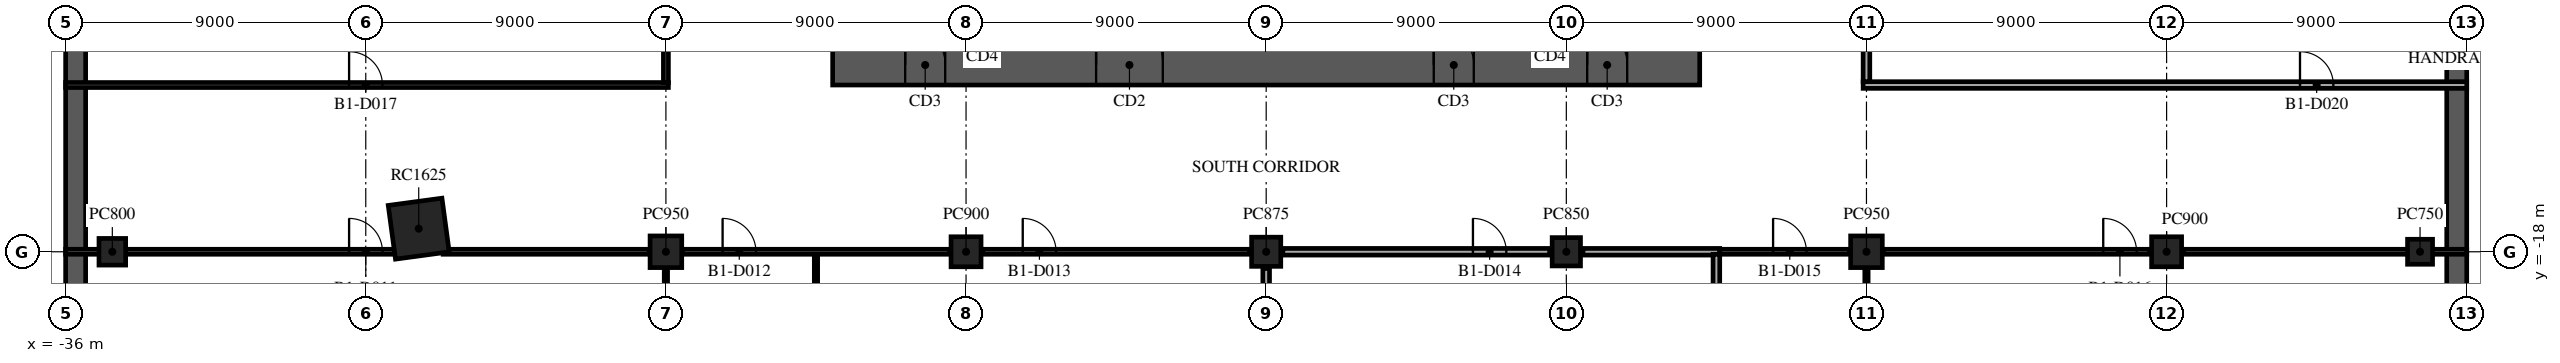
"""IFC4 building model, lengths in metres.
Left out: names, types, materials, properties, quantities, classifications, styles, units other than length and angle.
Written with IfcOpenShell. Run it as: python <this file> out.ifc"""

import sys

from ifc_helpers import new_model, si_unit, direction, frame, frame_2d, origin, origin_2d, place, context, subcontext, project, spatial, rectangle, extrude, element, fill, save


model = new_model("IFC4")
c1 = context("Model", 3, precision=1e-05, world=origin(), true_north=direction((0.0, 1.0)))
c2 = subcontext(c1, "Body", "Model", "MODEL_VIEW")
j1 = project(units=[si_unit("LENGTHUNIT", "METRE"), si_unit("PLANEANGLEUNIT", "RADIAN")], contexts=[c1])
p1 = place(None, origin())
s1 = spatial("IfcSite", under=j1, at=p1, CompositionType="ELEMENT")
p2 = place(p1, origin())
s2 = spatial("IfcBuilding", under=s1, at=p2, CompositionType="ELEMENT")
p3 = place(p2, frame((0.0, 0.0, -4.5)))
s3 = spatial("IfcBuildingStorey", under=s2, at=p3, CompositionType="ELEMENT", Elevation=-4.5)
for number, where, z_axis, x_axis in (
    (1, (35.7, -31.0, -0.3), (0.0, 0.0, 1.0), (0.0, 1.0, 0.0)),
    (2, (-35.7, 31.0, -0.3), (0.0, 0.0, 1.0), (0.0, -1.0, 0.0)),
):
    element("IfcWall", number, at=place(p3, frame(where, z_axis=z_axis, x_axis=x_axis)), inside=s3, PredefinedType="SOLIDWALL", context=c2, shape_type="SweptSolid", body=[
        extrude(rectangle(XDim=62.0, YDim=0.6, at=frame_2d((31.0, 0.0))), origin(), (0.0, 0.0, 1.0), 4.4),
    ])
p4 = place(p3, frame((-34.6, -18.0, 0.0), z_axis=(0.0, 0.0, 1.0), x_axis=(1.0, 0.0, 0.0)))
e3 = element("IfcColumn", 3, at=p4, inside=s3, PredefinedType="COLUMN", context=c2, shape_type="SweptSolid", body=[
    extrude(rectangle(XDim=0.8, YDim=0.8, at=origin_2d()), origin(), (0.0, 0.0, 1.0), 4.5),
])
p5 = place(p3, frame((-18.0, -18.0, 0.0), z_axis=(0.0, 0.0, 1.0), x_axis=(1.0, 0.0, 0.0)))
e4 = element("IfcColumn", 4, at=p5, inside=s3, PredefinedType="COLUMN", context=c2, shape_type="SweptSolid", body=[
    extrude(rectangle(XDim=0.95, YDim=0.95, at=origin_2d()), origin(), (0.0, 0.0, 1.0), 4.5),
])
p6 = place(p3, frame((-9.0, -18.0, 0.0), z_axis=(0.0, 0.0, 1.0), x_axis=(1.0, 0.0, 0.0)))
e5 = element("IfcColumn", 5, at=p6, inside=s3, PredefinedType="COLUMN", context=c2, shape_type="SweptSolid", body=[
    extrude(rectangle(XDim=0.9, YDim=0.9, at=origin_2d()), origin(), (0.0, 0.0, 1.0), 4.5),
])
p7 = place(p3, frame((0.0, -18.0, 0.0), z_axis=(0.0, 0.0, 1.0), x_axis=(1.0, 0.0, 0.0)))
e6 = element("IfcColumn", 6, at=p7, inside=s3, PredefinedType="COLUMN", context=c2, shape_type="SweptSolid", body=[
    extrude(rectangle(XDim=0.875, YDim=0.875, at=origin_2d()), origin(), (0.0, 0.0, 1.0), 4.5),
])
p8 = place(p3, frame((9.0, -18.0, 0.0), z_axis=(0.0, 0.0, 1.0), x_axis=(1.0, 0.0, 0.0)))
e7 = element("IfcColumn", 7, at=p8, inside=s3, PredefinedType="COLUMN", context=c2, shape_type="SweptSolid", body=[
    extrude(rectangle(XDim=0.85, YDim=0.85, at=origin_2d()), origin(), (0.0, 0.0, 1.0), 4.5),
])
p9 = place(p3, frame((18.0, -18.0, 0.0), z_axis=(0.0, 0.0, 1.0), x_axis=(1.0, 0.0, 0.0)))
e8 = element("IfcColumn", 8, at=p9, inside=s3, PredefinedType="COLUMN", context=c2, shape_type="SweptSolid", body=[
    extrude(rectangle(XDim=0.95, YDim=0.95, at=origin_2d()), origin(), (0.0, 0.0, 1.0), 4.5),
])
p10 = place(p3, frame((27.0, -18.0, 0.0), z_axis=(0.0, 0.0, 1.0), x_axis=(1.0, 0.0, 0.0)))
e9 = element("IfcColumn", 9, at=p10, inside=s3, PredefinedType="COLUMN", context=c2, shape_type="SweptSolid", body=[
    extrude(rectangle(XDim=0.9, YDim=0.9, at=origin_2d()), origin(), (0.0, 0.0, 1.0), 4.5),
])
p11 = place(p3, frame((34.6, -18.0, 0.0), z_axis=(0.0, 0.0, 1.0), x_axis=(1.0, 0.0, 0.0)))
e10 = element("IfcColumn", 10, at=p11, inside=s3, PredefinedType="COLUMN", context=c2, shape_type="SweptSolid", body=[
    extrude(rectangle(XDim=0.75, YDim=0.75, at=origin_2d()), origin(), (0.0, 0.0, 1.0), 4.5),
])
p12 = place(p3, frame((-25.412, -17.307, 0.0), z_axis=(0.0, 0.0, 1.0), x_axis=(0.991001197216, 0.133853005627, 0.0)))
e11 = element("IfcColumn", 11, at=p12, inside=s3, PredefinedType="COLUMN", context=c2, shape_type="SweptSolid", body=[
    extrude(rectangle(XDim=1.625, YDim=1.625, at=origin_2d()), origin(), (0.0, 0.0, 1.0), 4.5),
])
p13 = place(p3, frame((-13.0, -12.4, 0.0), z_axis=(0.0, 0.0, 1.0), x_axis=(1.0, 0.0, 0.0)))
e12 = element("IfcWall", 12, at=p13, inside=s3, PredefinedType="SHEAR", context=c2, shape_type="SweptSolid", body=[
    extrude(rectangle(XDim=26.0, YDim=1.2, at=frame_2d((13.0, 0.0))), origin(), (0.0, 0.0, 1.0), 4.1),
])
p14 = place(p13, frame((7.9, 0.0, 0.0)))
e13 = element("IfcOpeningElement", 13, at=p14, cuts=e12, PredefinedType="OPENING", context=c2, shape_type="SweptSolid", body=[
    extrude(rectangle(XDim=2.0, YDim=2.1, at=frame_2d((1.0, 1.05))), frame((0.0, 0.61, 0.0), z_axis=(0.0, -1.0, 0.0), x_axis=(1.0, 0.0, 0.0)), (0.0, 0.0, 1.0), 1.22),
])
p15 = place(p13, frame((18.025, 0.0, 0.0)))
e14 = element("IfcOpeningElement", 14, at=p15, cuts=e12, PredefinedType="OPENING", context=c2, shape_type="SweptSolid", body=[
    extrude(rectangle(XDim=1.2, YDim=2.1, at=frame_2d((0.6, 1.05))), frame((0.0, 0.61, 0.0), z_axis=(0.0, -1.0, 0.0), x_axis=(1.0, 0.0, 0.0)), (0.0, 0.0, 1.0), 1.22),
])
p16 = place(p13, frame((2.175, 0.0, 0.0)))
e15 = element("IfcOpeningElement", 15, at=p16, cuts=e12, PredefinedType="OPENING", context=c2, shape_type="SweptSolid", body=[
    extrude(rectangle(XDim=1.2, YDim=2.1, at=frame_2d((0.6, 1.05))), frame((0.0, 0.61, 0.0), z_axis=(0.0, -1.0, 0.0), x_axis=(1.0, 0.0, 0.0)), (0.0, 0.0, 1.0), 1.22),
])
p17 = place(p13, frame((22.625, 0.0, 0.0)))
e16 = element("IfcOpeningElement", 16, at=p17, cuts=e12, PredefinedType="OPENING", context=c2, shape_type="SweptSolid", body=[
    extrude(rectangle(XDim=1.2, YDim=2.1, at=frame_2d((0.6, 1.05))), frame((0.0, 0.61, 0.0), z_axis=(0.0, -1.0, 0.0), x_axis=(1.0, 0.0, 0.0)), (0.0, 0.0, 1.0), 1.22),
])
p18 = place(p3, frame((-36.0, -18.0, 0.0), z_axis=(0.0, 0.0, 1.0), x_axis=(1.0, 0.0, 0.0)))
e17 = element("IfcWall", 17, at=p18, inside=s3, PredefinedType="PARTITIONING", context=c2, shape_type="SweptSolid", body=[
    extrude(rectangle(XDim=9.857, YDim=0.15, at=frame_2d((4.928, 0.0))), origin(), (0.0, 0.0, 1.0), 4.1),
])
p19 = place(p18, frame((8.5, 0.0, 0.0)))
e18 = element("IfcOpeningElement", 18, at=p19, cuts=e17, PredefinedType="OPENING", context=c2, shape_type="SweptSolid", body=[
    extrude(rectangle(XDim=1.0, YDim=2.1, at=frame_2d((0.5, 1.05))), frame((0.0, 0.085, 0.0), z_axis=(0.0, -1.0, 0.0), x_axis=(1.0, 0.0, 0.0)), (0.0, 0.0, 1.0), 0.17),
])
p20 = place(p3, frame((-24.681, -18.0, 0.0), z_axis=(0.0, 0.0, 1.0), x_axis=(1.0, 0.0, 0.0)))
e19 = element("IfcWall", 19, at=p20, inside=s3, PredefinedType="PARTITIONING", context=c2, shape_type="SweptSolid", body=[
    extrude(rectangle(XDim=6.181, YDim=0.15, at=frame_2d((3.09, 0.0))), origin(), (0.0, 0.0, 1.0), 4.1),
])
p21 = place(p3, frame((-17.5, -18.0, 0.0), z_axis=(0.0, 0.0, 1.0), x_axis=(1.0, 0.0, 0.0)))
e20 = element("IfcWall", 20, at=p21, inside=s3, PredefinedType="PARTITIONING", context=c2, shape_type="SweptSolid", body=[
    extrude(rectangle(XDim=8.0, YDim=0.15, at=frame_2d((4.0, 0.0))), origin(), (0.0, 0.0, 1.0), 4.1),
])
p22 = place(p21, frame((1.2, 0.0, 0.0)))
e21 = element("IfcOpeningElement", 21, at=p22, cuts=e20, PredefinedType="OPENING", context=c2, shape_type="SweptSolid", body=[
    extrude(rectangle(XDim=1.0, YDim=2.1, at=frame_2d((0.5, 1.05))), frame((0.0, 0.085, 0.0), z_axis=(0.0, -1.0, 0.0), x_axis=(1.0, 0.0, 0.0)), (0.0, 0.0, 1.0), 0.17),
])
p23 = place(p3, frame((-8.5, -18.0, 0.0), z_axis=(0.0, 0.0, 1.0), x_axis=(1.0, 0.0, 0.0)))
e22 = element("IfcWall", 22, at=p23, inside=s3, PredefinedType="PARTITIONING", context=c2, shape_type="SweptSolid", body=[
    extrude(rectangle(XDim=8.0, YDim=0.15, at=frame_2d((4.0, 0.0))), origin(), (0.0, 0.0, 1.0), 4.1),
])
p24 = place(p23, frame((1.2, 0.0, 0.0)))
e23 = element("IfcOpeningElement", 23, at=p24, cuts=e22, PredefinedType="OPENING", context=c2, shape_type="SweptSolid", body=[
    extrude(rectangle(XDim=1.0, YDim=2.1, at=frame_2d((0.5, 1.05))), frame((0.0, 0.085, 0.0), z_axis=(0.0, -1.0, 0.0), x_axis=(1.0, 0.0, 0.0)), (0.0, 0.0, 1.0), 0.17),
])
p25 = place(p3, frame((0.5, -18.0, 0.0), z_axis=(0.0, 0.0, 1.0), x_axis=(1.0, 0.0, 0.0)))
e24 = element("IfcWall", 24, at=p25, inside=s3, PredefinedType="PARTITIONING", context=c2, shape_type="SweptSolid", body=[
    extrude(rectangle(XDim=8.0, YDim=0.2, at=frame_2d((4.0, 0.0))), origin(), (0.0, 0.0, 1.0), 4.1),
])
p26 = place(p25, frame((5.7, 0.0, 0.0)))
e25 = element("IfcOpeningElement", 25, at=p26, cuts=e24, PredefinedType="OPENING", context=c2, shape_type="SweptSolid", body=[
    extrude(rectangle(XDim=1.0, YDim=2.1, at=frame_2d((0.5, 1.05))), frame((0.0, 0.11, 0.0), z_axis=(0.0, -1.0, 0.0), x_axis=(1.0, 0.0, 0.0)), (0.0, 0.0, 1.0), 0.22),
])
p27 = place(p3, frame((9.5, -18.0, 0.0), z_axis=(0.0, 0.0, 1.0), x_axis=(1.0, 0.0, 0.0)))
e26 = element("IfcWall", 26, at=p27, inside=s3, PredefinedType="PARTITIONING", context=c2, shape_type="SweptSolid", body=[
    extrude(rectangle(XDim=4.1, YDim=0.2, at=frame_2d((2.05, 0.0))), origin(), (0.0, 0.0, 1.0), 4.1),
])
p28 = place(p3, frame((13.6, -18.0, 0.0), z_axis=(0.0, 0.0, 1.0), x_axis=(1.0, 0.0, 0.0)))
e27 = element("IfcWall", 27, at=p28, inside=s3, PredefinedType="PARTITIONING", context=c2, shape_type="SweptSolid", body=[
    extrude(rectangle(XDim=3.9, YDim=0.15, at=frame_2d((1.95, 0.0))), origin(), (0.0, 0.0, 1.0), 4.1),
])
p29 = place(p28, frame((1.6, 0.0, 0.0)))
e28 = element("IfcOpeningElement", 28, at=p29, cuts=e27, PredefinedType="OPENING", context=c2, shape_type="SweptSolid", body=[
    extrude(rectangle(XDim=1.0, YDim=2.1, at=frame_2d((0.5, 1.05))), frame((0.0, 0.085, 0.0), z_axis=(0.0, -1.0, 0.0), x_axis=(1.0, 0.0, 0.0)), (0.0, 0.0, 1.0), 0.17),
])
p30 = place(p3, frame((18.5, -18.0, 0.0), z_axis=(0.0, 0.0, 1.0), x_axis=(1.0, 0.0, 0.0)))
e29 = element("IfcWall", 29, at=p30, inside=s3, PredefinedType="PARTITIONING", context=c2, shape_type="SweptSolid", body=[
    extrude(rectangle(XDim=8.0, YDim=0.15, at=frame_2d((4.0, 0.0))), origin(), (0.0, 0.0, 1.0), 4.1),
])
p31 = place(p30, frame((6.6, 0.0, 0.0)))
e30 = element("IfcOpeningElement", 30, at=p31, cuts=e29, PredefinedType="OPENING", context=c2, shape_type="SweptSolid", body=[
    extrude(rectangle(XDim=1.0, YDim=2.1, at=frame_2d((0.5, 1.05))), frame((0.0, 0.085, 0.0), z_axis=(0.0, -1.0, 0.0), x_axis=(1.0, 0.0, 0.0)), (0.0, 0.0, 1.0), 0.17),
])
p32 = place(p3, frame((27.5, -18.0, 0.0), z_axis=(0.0, 0.0, 1.0), x_axis=(1.0, 0.0, 0.0)))
e31 = element("IfcWall", 31, at=p32, inside=s3, PredefinedType="PARTITIONING", context=c2, shape_type="SweptSolid", body=[
    extrude(rectangle(XDim=8.5, YDim=0.15, at=frame_2d((4.25, 0.0))), origin(), (0.0, 0.0, 1.0), 4.1),
])
p33 = place(p3, frame((-36.0, -13.0, 0.0), z_axis=(0.0, 0.0, 1.0), x_axis=(1.0, 0.0, 0.0)))
e32 = element("IfcWall", 32, at=p33, inside=s3, PredefinedType="PARTITIONING", context=c2, shape_type="SweptSolid", body=[
    extrude(rectangle(XDim=18.075, YDim=0.15, at=frame_2d((9.038, 0.0))), origin(), (0.0, 0.0, 1.0), 4.1),
])
p34 = place(p33, frame((8.5, 0.0, 0.0)))
e33 = element("IfcOpeningElement", 33, at=p34, cuts=e32, PredefinedType="OPENING", context=c2, shape_type="SweptSolid", body=[
    extrude(rectangle(XDim=1.0, YDim=2.1, at=frame_2d((0.5, 1.05))), frame((0.0, 0.085, 0.0), z_axis=(0.0, -1.0, 0.0), x_axis=(1.0, 0.0, 0.0)), (0.0, 0.0, 1.0), 0.17),
])
p35 = place(p3, frame((17.9, -13.0, 0.0), z_axis=(0.0, 0.0, 1.0), x_axis=(1.0, 0.0, 0.0)))
e34 = element("IfcWall", 34, at=p35, inside=s3, PredefinedType="PARTITIONING", context=c2, shape_type="SweptSolid", body=[
    extrude(rectangle(XDim=18.1, YDim=0.2, at=frame_2d((9.05, 0.0))), origin(), (0.0, 0.0, 1.0), 4.1),
])
p36 = place(p35, frame((13.1, 0.0, 0.0)))
e35 = element("IfcOpeningElement", 35, at=p36, cuts=e34, PredefinedType="OPENING", context=c2, shape_type="SweptSolid", body=[
    extrude(rectangle(XDim=1.0, YDim=2.1, at=frame_2d((0.5, 1.05))), frame((0.0, 0.11, 0.0), z_axis=(0.0, -1.0, 0.0), x_axis=(1.0, 0.0, 0.0)), (0.0, 0.0, 1.0), 0.22),
])
p37 = place(p3, frame((-18.0, -26.5, 0.0), z_axis=(0.0, 0.0, 1.0), x_axis=(0.0, 1.0, 0.0)))
e36 = element("IfcWall", 36, at=p37, inside=s3, PredefinedType="PARTITIONING", context=c2, shape_type="SweptSolid", body=[
    extrude(rectangle(XDim=8.0, YDim=0.1, at=frame_2d((4.0, 0.0))), origin(), (0.0, 0.0, 1.0), 4.1),
])
p38 = place(p3, frame((-18.0, -12.925, 0.0), z_axis=(0.0, 0.0, 1.0), x_axis=(0.0, 1.0, 0.0)))
e37 = element("IfcWall", 37, at=p38, inside=s3, PredefinedType="PARTITIONING", context=c2, shape_type="SweptSolid", body=[
    extrude(rectangle(XDim=3.425, YDim=0.15, at=frame_2d((1.712, 0.0))), origin(), (0.0, 0.0, 1.0), 4.1),
])
p39 = place(p3, frame((-13.5, -36.0, 0.0), z_axis=(0.0, 0.0, 1.0), x_axis=(0.0, 1.0, 0.0)))
e38 = element("IfcWall", 38, at=p39, inside=s3, PredefinedType="PARTITIONING", context=c2, shape_type="SweptSolid", body=[
    extrude(rectangle(XDim=17.925, YDim=0.1, at=frame_2d((8.962, 0.0))), origin(), (0.0, 0.0, 1.0), 4.1),
])
p40 = place(p3, frame((0.0, -26.5, 0.0), z_axis=(0.0, 0.0, 1.0), x_axis=(0.0, 1.0, 0.0)))
e39 = element("IfcWall", 39, at=p40, inside=s3, PredefinedType="PARTITIONING", context=c2, shape_type="SweptSolid", body=[
    extrude(rectangle(XDim=8.0, YDim=0.2, at=frame_2d((4.0, 0.0))), origin(), (0.0, 0.0, 1.0), 4.1),
])
p41 = place(p3, frame((13.5, -36.0, 0.0), z_axis=(0.0, 0.0, 1.0), x_axis=(0.0, 1.0, 0.0)))
e40 = element("IfcWall", 40, at=p41, inside=s3, PredefinedType="PARTITIONING", context=c2, shape_type="SweptSolid", body=[
    extrude(rectangle(XDim=17.925, YDim=0.2, at=frame_2d((8.962, 0.0))), origin(), (0.0, 0.0, 1.0), 4.1),
])
p42 = place(p3, frame((18.0, -24.681, 0.0), z_axis=(0.0, 0.0, 1.0), x_axis=(0.0, 1.0, 0.0)))
e41 = element("IfcWall", 41, at=p42, inside=s3, PredefinedType="PARTITIONING", context=c2, shape_type="SweptSolid", body=[
    extrude(rectangle(XDim=6.181, YDim=0.1, at=frame_2d((3.09, 0.0))), origin(), (0.0, 0.0, 1.0), 4.1),
])
p43 = place(p3, frame((18.0, -12.9, 0.0), z_axis=(0.0, 0.0, 1.0), x_axis=(0.0, 1.0, 0.0)))
e42 = element("IfcWall", 42, at=p43, inside=s3, PredefinedType="PARTITIONING", context=c2, shape_type="SweptSolid", body=[
    extrude(rectangle(XDim=3.4, YDim=0.2, at=frame_2d((1.7, 0.0))), origin(), (0.0, 0.0, 1.0), 4.1),
])
p44 = place(p14, origin())
e43 = element("IfcDoor", 43, at=p44, inside=s3, OperationType="SINGLE_SWING_LEFT", PredefinedType="DOOR", context=c2, shape_type="SweptSolid", body=[
    extrude(rectangle(XDim=2.0, YDim=2.1, at=frame_2d((1.0, 1.05))), frame((0.0, 0.025, 0.0), z_axis=(0.0, -1.0, 0.0), x_axis=(1.0, 0.0, 0.0)), (0.0, 0.0, 1.0), 0.05),
])
fill(e13, e43)
p45 = place(p15, origin())
e44 = element("IfcDoor", 44, at=p45, inside=s3, OperationType="SINGLE_SWING_LEFT", PredefinedType="DOOR", context=c2, shape_type="SweptSolid", body=[
    extrude(rectangle(XDim=1.2, YDim=2.1, at=frame_2d((0.6, 1.05))), frame((0.0, 0.025, 0.0), z_axis=(0.0, -1.0, 0.0), x_axis=(1.0, 0.0, 0.0)), (0.0, 0.0, 1.0), 0.05),
])
fill(e14, e44)
p46 = place(p16, origin())
e45 = element("IfcDoor", 45, at=p46, inside=s3, OperationType="SINGLE_SWING_LEFT", PredefinedType="DOOR", context=c2, shape_type="SweptSolid", body=[
    extrude(rectangle(XDim=1.2, YDim=2.1, at=frame_2d((0.6, 1.05))), frame((0.0, 0.025, 0.0), z_axis=(0.0, -1.0, 0.0), x_axis=(1.0, 0.0, 0.0)), (0.0, 0.0, 1.0), 0.05),
])
fill(e15, e45)
p47 = place(p17, origin())
e46 = element("IfcDoor", 46, at=p47, inside=s3, OperationType="SINGLE_SWING_LEFT", PredefinedType="DOOR", context=c2, shape_type="SweptSolid", body=[
    extrude(rectangle(XDim=1.2, YDim=2.1, at=frame_2d((0.6, 1.05))), frame((0.0, 0.025, 0.0), z_axis=(0.0, -1.0, 0.0), x_axis=(1.0, 0.0, 0.0)), (0.0, 0.0, 1.0), 0.05),
])
fill(e16, e46)
p48 = place(p19, origin())
e47 = element("IfcDoor", 47, at=p48, inside=s3, OperationType="SINGLE_SWING_LEFT", PredefinedType="DOOR", context=c2, shape_type="SweptSolid", body=[
    extrude(rectangle(XDim=1.0, YDim=2.1, at=frame_2d((0.5, 1.05))), frame((0.0, 0.025, 0.0), z_axis=(0.0, -1.0, 0.0), x_axis=(1.0, 0.0, 0.0)), (0.0, 0.0, 1.0), 0.05),
])
fill(e18, e47)
p49 = place(p22, origin())
e48 = element("IfcDoor", 48, at=p49, inside=s3, OperationType="SINGLE_SWING_RIGHT", PredefinedType="DOOR", context=c2, shape_type="SweptSolid", body=[
    extrude(rectangle(XDim=1.0, YDim=2.1, at=frame_2d((0.5, 1.05))), frame((0.0, 0.025, 0.0), z_axis=(0.0, -1.0, 0.0), x_axis=(1.0, 0.0, 0.0)), (0.0, 0.0, 1.0), 0.05),
])
fill(e21, e48)
p50 = place(p24, origin())
e49 = element("IfcDoor", 49, at=p50, inside=s3, OperationType="SINGLE_SWING_LEFT", PredefinedType="DOOR", context=c2, shape_type="SweptSolid", body=[
    extrude(rectangle(XDim=1.0, YDim=2.1, at=frame_2d((0.5, 1.05))), frame((0.0, 0.025, 0.0), z_axis=(0.0, -1.0, 0.0), x_axis=(1.0, 0.0, 0.0)), (0.0, 0.0, 1.0), 0.05),
])
fill(e23, e49)
p51 = place(p26, origin())
e50 = element("IfcDoor", 50, at=p51, inside=s3, OperationType="SINGLE_SWING_RIGHT", PredefinedType="DOOR", context=c2, shape_type="SweptSolid", body=[
    extrude(rectangle(XDim=1.0, YDim=2.1, at=frame_2d((0.5, 1.05))), frame((0.0, 0.025, 0.0), z_axis=(0.0, -1.0, 0.0), x_axis=(1.0, 0.0, 0.0)), (0.0, 0.0, 1.0), 0.05),
])
fill(e25, e50)
p52 = place(p29, origin())
e51 = element("IfcDoor", 51, at=p52, inside=s3, OperationType="SINGLE_SWING_LEFT", PredefinedType="DOOR", context=c2, shape_type="SweptSolid", body=[
    extrude(rectangle(XDim=1.0, YDim=2.1, at=frame_2d((0.5, 1.05))), frame((0.0, 0.025, 0.0), z_axis=(0.0, -1.0, 0.0), x_axis=(1.0, 0.0, 0.0)), (0.0, 0.0, 1.0), 0.05),
])
fill(e28, e51)
p53 = place(p31, origin())
e52 = element("IfcDoor", 52, at=p53, inside=s3, OperationType="SINGLE_SWING_RIGHT", PredefinedType="DOOR", context=c2, shape_type="SweptSolid", body=[
    extrude(rectangle(XDim=1.0, YDim=2.1, at=frame_2d((0.5, 1.05))), frame((0.0, 0.025, 0.0), z_axis=(0.0, -1.0, 0.0), x_axis=(1.0, 0.0, 0.0)), (0.0, 0.0, 1.0), 0.05),
])
fill(e30, e52)
p54 = place(p34, origin())
e53 = element("IfcDoor", 53, at=p54, inside=s3, OperationType="SINGLE_SWING_LEFT", PredefinedType="DOOR", context=c2, shape_type="SweptSolid", body=[
    extrude(rectangle(XDim=1.0, YDim=2.1, at=frame_2d((0.5, 1.05))), frame((0.0, 0.025, 0.0), z_axis=(0.0, -1.0, 0.0), x_axis=(1.0, 0.0, 0.0)), (0.0, 0.0, 1.0), 0.05),
])
fill(e33, e53)
p55 = place(p36, origin())
e54 = element("IfcDoor", 54, at=p55, inside=s3, OperationType="SINGLE_SWING_RIGHT", PredefinedType="DOOR", context=c2, shape_type="SweptSolid", body=[
    extrude(rectangle(XDim=1.0, YDim=2.1, at=frame_2d((0.5, 1.05))), frame((0.0, 0.025, 0.0), z_axis=(0.0, -1.0, 0.0), x_axis=(1.0, 0.0, 0.0)), (0.0, 0.0, 1.0), 0.05),
])
fill(e35, e54)
save(model, sys.argv[1])
